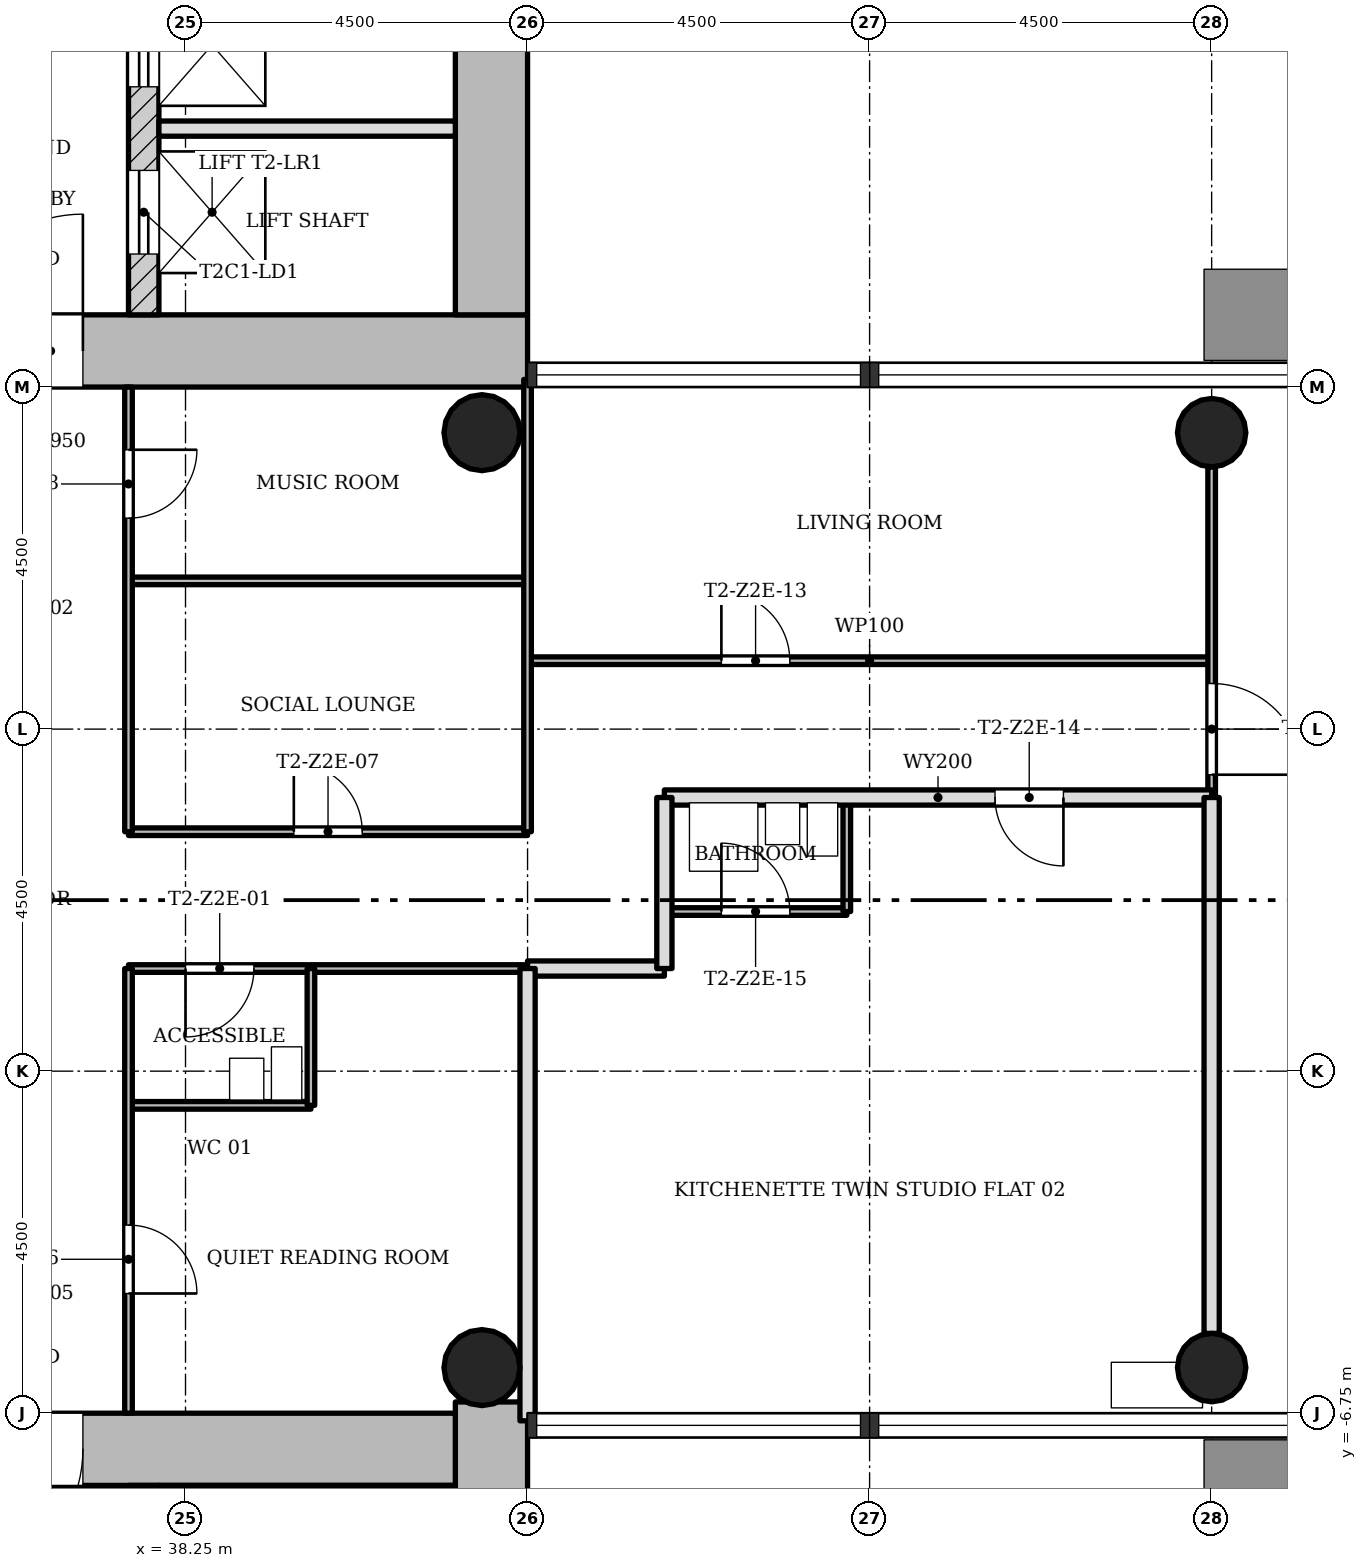
"""IFC4 building model, lengths in metres.
Left out: names, types, materials, properties, quantities, classifications, styles, units other than length and angle.
Written with IfcOpenShell. Run it as: python <this file> out.ifc"""

import sys

from ifc_helpers import new_model, si_unit, direction, frame, frame_2d, origin, origin_2d, place, context, subcontext, project, spatial, rectangle, hollow_circle, extrude, element, fill, save


model = new_model("IFC4")
c1 = context("Model", 3, precision=1e-05, world=origin(), true_north=direction((0.0, 1.0)))
c2 = subcontext(c1, "Body", "Model", "MODEL_VIEW")
j1 = project(units=[si_unit("LENGTHUNIT", "METRE"), si_unit("PLANEANGLEUNIT", "RADIAN")], contexts=[c1])
p1 = place(None, origin())
s1 = spatial("IfcSite", under=j1, at=p1, CompositionType="ELEMENT")
p2 = place(p1, origin())
s2 = spatial("IfcBuilding", under=s1, at=p2, CompositionType="ELEMENT")
p3 = place(p2, frame((0.0, 0.0, 100.4)))
s3 = spatial("IfcBuildingStorey", under=s2, at=p3, CompositionType="ELEMENT", Elevation=100.4)
p4 = place(p3, frame((30.2, 7.225, 0.0), z_axis=(0.0, 0.0, 1.0), x_axis=(1.0, 0.0, 0.0)))
e1 = element("IfcWall", 1, at=p4, inside=s3, PredefinedType="SHEAR", context=c2, shape_type="SweptSolid", body=[
    extrude(rectangle(XDim=12.55, YDim=0.95, at=frame_2d((6.275, 0.0))), origin(), (0.0, 0.0, 1.0), 3.4),
])
p5 = place(p4, frame((4.9, 0.0, 0.0)))
e2 = element("IfcOpeningElement", 2, at=p5, cuts=e1, PredefinedType="OPENING", context=c2, shape_type="SweptSolid", body=[
    extrude(rectangle(XDim=1.8, YDim=2.1, at=frame_2d((0.9, 1.05))), frame((0.0, 0.485, 0.0), z_axis=(0.0, -1.0, 0.0), x_axis=(1.0, 0.0, 0.0)), (0.0, 0.0, 1.0), 0.97),
])
p6 = place(p3, frame((42.275, 7.7, 0.0), z_axis=(0.0, 0.0, 1.0), x_axis=(0.0, 1.0, 0.0)))
e3 = element("IfcWall", 3, at=p6, inside=s3, PredefinedType="SHEAR", context=c2, shape_type="SweptSolid", body=[
    extrude(rectangle(XDim=8.05, YDim=0.95, at=frame_2d((4.025, 0.0))), origin(), (0.0, 0.0, 1.0), 3.4),
])
p7 = place(p3, frame((37.7, 7.7, 0.0), z_axis=(0.0, 0.0, 1.0), x_axis=(0.0, 1.0, 0.0)))
e4 = element("IfcWall", 4, at=p7, inside=s3, PredefinedType="SHEAR", context=c2, shape_type="SweptSolid", body=[
    extrude(rectangle(XDim=7.1, YDim=0.4, at=frame_2d((3.55, 0.0))), origin(), (0.0, 0.0, 1.0), 3.4),
])
p8 = place(p7, frame((0.8, 0.0, 0.0)))
e5 = element("IfcOpeningElement", 5, at=p8, cuts=e4, PredefinedType="OPENING", context=c2, shape_type="SweptSolid", body=[
    extrude(rectangle(XDim=1.1, YDim=2.1, at=frame_2d((0.55, 1.05))), frame((0.0, 0.21, 0.0), z_axis=(0.0, -1.0, 0.0), x_axis=(1.0, 0.0, 0.0)), (0.0, 0.0, 1.0), 0.42),
])
p9 = place(p7, frame((3.0, 0.0, 0.0)))
e6 = element("IfcOpeningElement", 6, at=p9, cuts=e4, PredefinedType="OPENING", context=c2, shape_type="SweptSolid", body=[
    extrude(rectangle(XDim=1.1, YDim=2.1, at=frame_2d((0.55, 1.05))), frame((0.0, 0.21, 0.0), z_axis=(0.0, -1.0, 0.0), x_axis=(1.0, 0.0, 0.0)), (0.0, 0.0, 1.0), 0.42),
])
p10 = place(p7, frame((5.2, 0.0, 0.0)))
e7 = element("IfcOpeningElement", 7, at=p10, cuts=e4, PredefinedType="OPENING", context=c2, shape_type="SweptSolid", body=[
    extrude(rectangle(XDim=1.1, YDim=2.1, at=frame_2d((0.55, 1.05))), frame((0.0, 0.21, 0.0), z_axis=(0.0, -1.0, 0.0), x_axis=(1.0, 0.0, 0.0)), (0.0, 0.0, 1.0), 0.42),
])
p11 = place(p3, frame((42.275, -14.8, 0.0), z_axis=(0.0, 0.0, 1.0), x_axis=(0.0, 1.0, 0.0)))
e8 = element("IfcWall", 8, at=p11, inside=s3, PredefinedType="SHEAR", context=c2, shape_type="SweptSolid", body=[
    extrude(rectangle(XDim=8.198, YDim=0.95, at=frame_2d((4.099, 0.0))), origin(), (0.0, 0.0, 1.0), 3.4),
])
p12 = place(p3, frame((41.8, -7.225, 0.0), z_axis=(0.0, 0.0, 1.0), x_axis=(-1.0, 0.0, 0.0)))
e9 = element("IfcWall", 9, at=p12, inside=s3, PredefinedType="SHEAR", context=c2, shape_type="SweptSolid", body=[
    extrude(rectangle(XDim=12.55, YDim=0.95, at=frame_2d((6.275, 0.0))), origin(), (0.0, 0.0, 1.0), 3.4),
])
p13 = place(p12, frame((4.9, 0.0, 0.0)))
e10 = element("IfcOpeningElement", 10, at=p13, cuts=e9, PredefinedType="OPENING", context=c2, shape_type="SweptSolid", body=[
    extrude(rectangle(XDim=1.8, YDim=2.1, at=frame_2d((0.9, 1.05))), frame((0.0, 0.485, 0.0), z_axis=(0.0, -1.0, 0.0), x_axis=(1.0, 0.0, 0.0)), (0.0, 0.0, 1.0), 0.97),
])
p14 = place(p3, frame((37.7, -14.8, 0.0), z_axis=(0.0, 0.0, 1.0), x_axis=(0.0, 1.0, 0.0)))
e11 = element("IfcWall", 11, at=p14, inside=s3, PredefinedType="SHEAR", context=c2, shape_type="SweptSolid", body=[
    extrude(rectangle(XDim=7.1, YDim=0.4, at=frame_2d((3.55, 0.0))), origin(), (0.0, 0.0, 1.0), 3.4),
])
p15 = place(p14, frame((5.5, 0.0, 0.0)))
e12 = element("IfcOpeningElement", 12, at=p15, cuts=e11, PredefinedType="OPENING", context=c2, shape_type="SweptSolid", body=[
    extrude(rectangle(XDim=0.9, YDim=2.1, at=frame_2d((0.45, 1.05))), frame((0.0, 0.21, 0.0), z_axis=(0.0, -1.0, 0.0), x_axis=(1.0, 0.0, 0.0)), (0.0, 0.0, 1.0), 0.42),
])
for number, where, z_axis, x_axis in (
    (13, (51.75, -6.15, 0.0), (0.0, 0.0, 1.0), (1.0, 0.0, 0.0)),
    (14, (51.75, 6.15, 0.0), (0.0, 0.0, 1.0), (1.0, 0.0, 0.0)),
):
    element("IfcColumn", number, at=place(p3, frame(where, z_axis=z_axis, x_axis=x_axis)), inside=s3, PredefinedType="COLUMN", context=c2, shape_type="SweptSolid", body=[
        extrude(hollow_circle(Radius=0.45, WallThickness=0.032, at=origin_2d()), origin(), (0.0, 0.0, 1.0), 3.4),
    ])
for number, where, z_axis, x_axis in (
    (15, (42.15, -6.15, 0.0), (0.0, 0.0, 1.0), (1.0, 0.0, 0.0)),
    (16, (42.15, 6.15, 0.0), (0.0, 0.0, 1.0), (1.0, 0.0, 0.0)),
):
    element("IfcColumn", number, at=place(p3, frame(where, z_axis=z_axis, x_axis=x_axis)), inside=s3, PredefinedType="COLUMN", context=c2, shape_type="SweptSolid", body=[
        extrude(hollow_circle(Radius=0.5, WallThickness=0.036, at=origin_2d()), origin(), (0.0, 0.0, 1.0), 3.4),
    ])
p16 = place(p3, frame((41.8, 10.15, 0.0), z_axis=(0.0, 0.0, 1.0), x_axis=(-1.0, 0.0, 0.0)))
e17 = element("IfcWall", 17, at=p16, inside=s3, PredefinedType="SOLIDWALL", context=c2, shape_type="SweptSolid", body=[
    extrude(rectangle(XDim=3.9, YDim=0.2, at=frame_2d((1.95, 0.0))), origin(), (0.0, 0.0, 1.0), 3.0),
])
p17 = place(p3, frame((39.9, -2.7, 0.0), z_axis=(0.0, 0.0, 1.0), x_axis=(-1.0, 0.0, 0.0)))
e18 = element("IfcWall", 18, at=p17, inside=s3, PredefinedType="PARTITIONING", context=c2, shape_type="SweptSolid", body=[
    extrude(rectangle(XDim=2.4, YDim=0.1, at=frame_2d((1.2, 0.0))), origin(), (0.0, 0.0, 1.0), 3.0),
])
p18 = place(p3, frame((42.75, -0.9, 0.0), z_axis=(0.0, 0.0, 1.0), x_axis=(-1.0, 0.0, 0.0)))
e19 = element("IfcWall", 19, at=p18, inside=s3, PredefinedType="PARTITIONING", context=c2, shape_type="SweptSolid", body=[
    extrude(rectangle(XDim=5.25, YDim=0.1, at=frame_2d((2.625, 0.0))), origin(), (0.0, 0.0, 1.0), 3.0),
])
p19 = place(p18, frame((3.6, 0.0, 0.0)))
e20 = element("IfcOpeningElement", 20, at=p19, cuts=e19, PredefinedType="OPENING", context=c2, shape_type="SweptSolid", body=[
    extrude(rectangle(XDim=0.9, YDim=2.1, at=frame_2d((0.45, 1.05))), frame((0.0, 0.06, 0.0), z_axis=(0.0, -1.0, 0.0), x_axis=(1.0, 0.0, 0.0)), (0.0, 0.0, 1.0), 0.12),
])
p20 = place(p3, frame((44.55, -0.9, 0.0), z_axis=(0.0, 0.0, 1.0), x_axis=(-1.0, 0.0, 0.0)))
e21 = element("IfcWall", 21, at=p20, inside=s3, PredefinedType="SOLIDWALL", context=c2, shape_type="SweptSolid", body=[
    extrude(rectangle(XDim=1.8, YDim=0.2, at=frame_2d((0.9, 0.0))), origin(), (0.0, 0.0, 1.0), 3.0),
])
p21 = place(p3, frame((46.95, -0.15, 0.0), z_axis=(0.0, 0.0, 1.0), x_axis=(-1.0, 0.0, 0.0)))
e22 = element("IfcWall", 22, at=p21, inside=s3, PredefinedType="PARTITIONING", context=c2, shape_type="SweptSolid", body=[
    extrude(rectangle(XDim=2.4, YDim=0.1, at=frame_2d((1.2, 0.0))), origin(), (0.0, 0.0, 1.0), 3.0),
])
p22 = place(p21, frame((0.75, 0.0, 0.0)))
e23 = element("IfcOpeningElement", 23, at=p22, cuts=e22, PredefinedType="OPENING", context=c2, shape_type="SweptSolid", body=[
    extrude(rectangle(XDim=0.9, YDim=2.1, at=frame_2d((0.45, 1.05))), frame((0.0, 0.06, 0.0), z_axis=(0.0, -1.0, 0.0), x_axis=(1.0, 0.0, 0.0)), (0.0, 0.0, 1.0), 0.12),
])
p23 = place(p3, frame((42.75, 0.9, 0.0), z_axis=(0.0, 0.0, 1.0), x_axis=(-1.0, 0.0, 0.0)))
e24 = element("IfcWall", 24, at=p23, inside=s3, PredefinedType="PARTITIONING", context=c2, shape_type="SweptSolid", body=[
    extrude(rectangle(XDim=5.25, YDim=0.1, at=frame_2d((2.625, 0.0))), origin(), (0.0, 0.0, 1.0), 3.0),
])
p24 = place(p23, frame((2.175, 0.0, 0.0)))
e25 = element("IfcOpeningElement", 25, at=p24, cuts=e24, PredefinedType="OPENING", context=c2, shape_type="SweptSolid", body=[
    extrude(rectangle(XDim=0.9, YDim=2.1, at=frame_2d((0.45, 1.05))), frame((0.0, 0.06, 0.0), z_axis=(0.0, -1.0, 0.0), x_axis=(1.0, 0.0, 0.0)), (0.0, 0.0, 1.0), 0.12),
])
p25 = place(p3, frame((51.75, 1.35, 0.0), z_axis=(0.0, 0.0, 1.0), x_axis=(-1.0, 0.0, 0.0)))
e26 = element("IfcWall", 26, at=p25, inside=s3, PredefinedType="SOLIDWALL", context=c2, shape_type="SweptSolid", body=[
    extrude(rectangle(XDim=7.2, YDim=0.2, at=frame_2d((3.6, 0.0))), origin(), (0.0, 0.0, 1.0), 3.0),
])
p26 = place(p25, frame((1.95, 0.0, 0.0)))
e27 = element("IfcOpeningElement", 27, at=p26, cuts=e26, PredefinedType="OPENING", context=c2, shape_type="SweptSolid", body=[
    extrude(rectangle(XDim=0.9, YDim=2.1, at=frame_2d((0.45, 1.05))), frame((0.0, 0.11, 0.0), z_axis=(0.0, -1.0, 0.0), x_axis=(1.0, 0.0, 0.0)), (0.0, 0.0, 1.0), 0.22),
])
p27 = place(p3, frame((51.75, 3.15, 0.0), z_axis=(0.0, 0.0, 1.0), x_axis=(-1.0, 0.0, 0.0)))
e28 = element("IfcWall", 28, at=p27, inside=s3, PredefinedType="PARTITIONING", context=c2, shape_type="SweptSolid", body=[
    extrude(rectangle(XDim=9.0, YDim=0.1, at=frame_2d((4.5, 0.0))), origin(), (0.0, 0.0, 1.0), 3.0),
])
p28 = place(p27, frame((5.55, 0.0, 0.0)))
e29 = element("IfcOpeningElement", 29, at=p28, cuts=e28, PredefinedType="OPENING", context=c2, shape_type="SweptSolid", body=[
    extrude(rectangle(XDim=0.9, YDim=2.1, at=frame_2d((0.45, 1.05))), frame((0.0, 0.06, 0.0), z_axis=(0.0, -1.0, 0.0), x_axis=(1.0, 0.0, 0.0)), (0.0, 0.0, 1.0), 0.12),
])
p29 = place(p3, frame((42.75, 4.2, 0.0), z_axis=(0.0, 0.0, 1.0), x_axis=(-1.0, 0.0, 0.0)))
e30 = element("IfcWall", 30, at=p29, inside=s3, PredefinedType="PARTITIONING", context=c2, shape_type="SweptSolid", body=[
    extrude(rectangle(XDim=5.25, YDim=0.1, at=frame_2d((2.625, 0.0))), origin(), (0.0, 0.0, 1.0), 3.0),
])
p30 = place(p3, frame((51.75, 1.35, 0.0), z_axis=(0.0, 0.0, 1.0), x_axis=(0.0, 1.0, 0.0)))
e31 = element("IfcWall", 31, at=p30, inside=s3, PredefinedType="PARTITIONING", context=c2, shape_type="SweptSolid", body=[
    extrude(rectangle(XDim=4.35, YDim=0.1, at=frame_2d((2.175, 0.0))), origin(), (0.0, 0.0, 1.0), 3.0),
])
p31 = place(p30, frame((0.3, 0.0, 0.0)))
e32 = element("IfcOpeningElement", 32, at=p31, cuts=e31, PredefinedType="OPENING", context=c2, shape_type="SweptSolid", body=[
    extrude(rectangle(XDim=1.2, YDim=2.1, at=frame_2d((0.6, 1.05))), frame((0.0, 0.06, 0.0), z_axis=(0.0, -1.0, 0.0), x_axis=(1.0, 0.0, 0.0)), (0.0, 0.0, 1.0), 0.12),
])
p32 = place(p3, frame((51.75, -5.7, 0.0), z_axis=(0.0, 0.0, 1.0), x_axis=(0.0, 1.0, 0.0)))
e33 = element("IfcWall", 33, at=p32, inside=s3, PredefinedType="SOLIDWALL", context=c2, shape_type="SweptSolid", body=[
    extrude(rectangle(XDim=7.05, YDim=0.2, at=frame_2d((3.525, 0.0))), origin(), (0.0, 0.0, 1.0), 3.0),
])
p33 = place(p3, frame((46.95, -0.15, 0.0), z_axis=(0.0, 0.0, 1.0), x_axis=(0.0, 1.0, 0.0)))
e34 = element("IfcWall", 34, at=p33, inside=s3, PredefinedType="PARTITIONING", context=c2, shape_type="SweptSolid", body=[
    extrude(rectangle(XDim=1.5, YDim=0.1, at=frame_2d((0.75, 0.0))), origin(), (0.0, 0.0, 1.0), 3.0),
])
p34 = place(p3, frame((44.55, -0.9, 0.0), z_axis=(0.0, 0.0, 1.0), x_axis=(0.0, 1.0, 0.0)))
e35 = element("IfcWall", 35, at=p34, inside=s3, PredefinedType="SOLIDWALL", context=c2, shape_type="SweptSolid", body=[
    extrude(rectangle(XDim=2.25, YDim=0.2, at=frame_2d((1.125, 0.0))), origin(), (0.0, 0.0, 1.0), 3.0),
])
p35 = place(p3, frame((42.75, 0.9, 0.0), z_axis=(0.0, 0.0, 1.0), x_axis=(0.0, 1.0, 0.0)))
e36 = element("IfcWall", 36, at=p35, inside=s3, PredefinedType="PARTITIONING", context=c2, shape_type="SweptSolid", body=[
    extrude(rectangle(XDim=5.95, YDim=0.1, at=frame_2d((2.975, 0.0))), origin(), (0.0, 0.0, 1.0), 3.0),
])
p36 = place(p3, frame((42.75, -6.85, 0.0), z_axis=(0.0, 0.0, 1.0), x_axis=(0.0, 1.0, 0.0)))
e37 = element("IfcWall", 37, at=p36, inside=s3, PredefinedType="SOLIDWALL", context=c2, shape_type="SweptSolid", body=[
    extrude(rectangle(XDim=5.95, YDim=0.2, at=frame_2d((2.975, 0.0))), origin(), (0.0, 0.0, 1.0), 3.0),
])
p37 = place(p3, frame((39.9, -2.7, 0.0), z_axis=(0.0, 0.0, 1.0), x_axis=(0.0, 1.0, 0.0)))
e38 = element("IfcWall", 38, at=p37, inside=s3, PredefinedType="PARTITIONING", context=c2, shape_type="SweptSolid", body=[
    extrude(rectangle(XDim=1.8, YDim=0.1, at=frame_2d((0.9, 0.0))), origin(), (0.0, 0.0, 1.0), 3.0),
])
p38 = place(p3, frame((37.5, -6.75, 0.0), z_axis=(0.0, 0.0, 1.0), x_axis=(0.0, 1.0, 0.0)))
e39 = element("IfcWall", 39, at=p38, inside=s3, PredefinedType="PARTITIONING", context=c2, shape_type="SweptSolid", body=[
    extrude(rectangle(XDim=5.85, YDim=0.1, at=frame_2d((2.925, 0.0))), origin(), (0.0, 0.0, 1.0), 3.0),
])
p39 = place(p38, frame((1.575, 0.0, 0.0)))
e40 = element("IfcOpeningElement", 40, at=p39, cuts=e39, PredefinedType="OPENING", context=c2, shape_type="SweptSolid", body=[
    extrude(rectangle(XDim=0.9, YDim=2.1, at=frame_2d((0.45, 1.05))), frame((0.0, 0.06, 0.0), z_axis=(0.0, -1.0, 0.0), x_axis=(1.0, 0.0, 0.0)), (0.0, 0.0, 1.0), 0.12),
])
p40 = place(p3, frame((37.5, 0.9, 0.0), z_axis=(0.0, 0.0, 1.0), x_axis=(0.0, 1.0, 0.0)))
e41 = element("IfcWall", 41, at=p40, inside=s3, PredefinedType="PARTITIONING", context=c2, shape_type="SweptSolid", body=[
    extrude(rectangle(XDim=5.85, YDim=0.1, at=frame_2d((2.925, 0.0))), origin(), (0.0, 0.0, 1.0), 3.0),
])
p41 = place(p40, frame((4.125, 0.0, 0.0)))
e42 = element("IfcOpeningElement", 42, at=p41, cuts=e41, PredefinedType="OPENING", context=c2, shape_type="SweptSolid", body=[
    extrude(rectangle(XDim=0.9, YDim=2.1, at=frame_2d((0.45, 1.05))), frame((0.0, 0.06, 0.0), z_axis=(0.0, -1.0, 0.0), x_axis=(1.0, 0.0, 0.0)), (0.0, 0.0, 1.0), 0.12),
])
p42 = place(p3, frame((37.9, -7.825, 0.0), z_axis=(0.0, 0.0, 1.0), x_axis=(1.0, 0.0, 0.0)))
e43 = element("IfcWall", 43, at=p42, inside=s3, PredefinedType="SHEAR", context=c2, shape_type="SweptSolid", body=[
    extrude(rectangle(XDim=3.9, YDim=0.25, at=frame_2d((1.95, 0.0))), origin(), (0.0, 0.0, 1.0), 3.4),
])
p43 = place(p19, origin())
e44 = element("IfcDoor", 44, at=p43, inside=s3, OperationType="SINGLE_SWING_LEFT", PredefinedType="DOOR", context=c2, shape_type="SweptSolid", body=[
    extrude(rectangle(XDim=0.9, YDim=2.1, at=frame_2d((0.45, 1.05))), frame((0.0, 0.025, 0.0), z_axis=(0.0, -1.0, 0.0), x_axis=(1.0, 0.0, 0.0)), (0.0, 0.0, 1.0), 0.05),
])
fill(e20, e44)
p44 = place(p39, origin())
e45 = element("IfcDoor", 45, at=p44, inside=s3, OperationType="SINGLE_SWING_LEFT", PredefinedType="DOOR", context=c2, shape_type="SweptSolid", body=[
    extrude(rectangle(XDim=0.9, YDim=2.1, at=frame_2d((0.45, 1.05))), frame((0.0, 0.025, 0.0), z_axis=(0.0, -1.0, 0.0), x_axis=(1.0, 0.0, 0.0)), (0.0, 0.0, 1.0), 0.05),
])
fill(e40, e45)
p45 = place(p24, origin())
e46 = element("IfcDoor", 46, at=p45, inside=s3, OperationType="SINGLE_SWING_RIGHT", PredefinedType="DOOR", context=c2, shape_type="SweptSolid", body=[
    extrude(rectangle(XDim=0.9, YDim=2.1, at=frame_2d((0.45, 1.05))), frame((0.0, 0.025, 0.0), z_axis=(0.0, -1.0, 0.0), x_axis=(1.0, 0.0, 0.0)), (0.0, 0.0, 1.0), 0.05),
])
fill(e25, e46)
p46 = place(p41, origin())
e47 = element("IfcDoor", 47, at=p46, inside=s3, OperationType="SINGLE_SWING_RIGHT", PredefinedType="DOOR", context=c2, shape_type="SweptSolid", body=[
    extrude(rectangle(XDim=0.9, YDim=2.1, at=frame_2d((0.45, 1.05))), frame((0.0, 0.025, 0.0), z_axis=(0.0, -1.0, 0.0), x_axis=(1.0, 0.0, 0.0)), (0.0, 0.0, 1.0), 0.05),
])
fill(e42, e47)
p47 = place(p28, origin())
e48 = element("IfcDoor", 48, at=p47, inside=s3, OperationType="SINGLE_SWING_RIGHT", PredefinedType="DOOR", context=c2, shape_type="SweptSolid", body=[
    extrude(rectangle(XDim=0.9, YDim=2.1, at=frame_2d((0.45, 1.05))), frame((0.0, 0.025, 0.0), z_axis=(0.0, -1.0, 0.0), x_axis=(1.0, 0.0, 0.0)), (0.0, 0.0, 1.0), 0.05),
])
fill(e29, e48)
p48 = place(p26, origin())
e49 = element("IfcDoor", 49, at=p48, inside=s3, OperationType="SINGLE_SWING_RIGHT", PredefinedType="DOOR", context=c2, shape_type="SweptSolid", body=[
    extrude(rectangle(XDim=0.9, YDim=2.1, at=frame_2d((0.45, 1.05))), frame((0.0, 0.025, 0.0), z_axis=(0.0, -1.0, 0.0), x_axis=(1.0, 0.0, 0.0)), (0.0, 0.0, 1.0), 0.05),
])
fill(e27, e49)
p49 = place(p22, origin())
e50 = element("IfcDoor", 50, at=p49, inside=s3, OperationType="SINGLE_SWING_RIGHT", PredefinedType="DOOR", context=c2, shape_type="SweptSolid", body=[
    extrude(rectangle(XDim=0.9, YDim=2.1, at=frame_2d((0.45, 1.05))), frame((0.0, 0.025, 0.0), z_axis=(0.0, -1.0, 0.0), x_axis=(1.0, 0.0, 0.0)), (0.0, 0.0, 1.0), 0.05),
])
fill(e23, e50)
p50 = place(p31, origin())
e51 = element("IfcDoor", 51, at=p50, inside=s3, OperationType="SINGLE_SWING_LEFT", PredefinedType="DOOR", context=c2, shape_type="SweptSolid", body=[
    extrude(rectangle(XDim=1.2, YDim=2.1, at=frame_2d((0.6, 1.05))), frame((0.0, 0.025, 0.0), z_axis=(0.0, -1.0, 0.0), x_axis=(1.0, 0.0, 0.0)), (0.0, 0.0, 1.0), 0.05),
])
fill(e32, e51)
p51 = place(p8, origin())
e52 = element("IfcDoor", 52, at=p51, inside=s3, OperationType="SLIDING_TO_LEFT", PredefinedType="DOOR", context=c2, shape_type="SweptSolid", body=[
    extrude(rectangle(XDim=1.1, YDim=2.1, at=frame_2d((0.55, 1.05))), frame((0.0, 0.025, 0.0), z_axis=(0.0, -1.0, 0.0), x_axis=(1.0, 0.0, 0.0)), (0.0, 0.0, 1.0), 0.05),
])
fill(e5, e52)
p52 = place(p9, origin())
e53 = element("IfcDoor", 53, at=p52, inside=s3, OperationType="SLIDING_TO_LEFT", PredefinedType="DOOR", context=c2, shape_type="SweptSolid", body=[
    extrude(rectangle(XDim=1.1, YDim=2.1, at=frame_2d((0.55, 1.05))), frame((0.0, 0.025, 0.0), z_axis=(0.0, -1.0, 0.0), x_axis=(1.0, 0.0, 0.0)), (0.0, 0.0, 1.0), 0.05),
])
fill(e6, e53)
p53 = place(p5, origin())
e54 = element("IfcDoor", 54, at=p53, inside=s3, OperationType="SINGLE_SWING_LEFT", PredefinedType="DOOR", context=c2, shape_type="SweptSolid", body=[
    extrude(rectangle(XDim=1.8, YDim=2.1, at=frame_2d((0.9, 1.05))), frame((0.0, 0.025, 0.0), z_axis=(0.0, -1.0, 0.0), x_axis=(1.0, 0.0, 0.0)), (0.0, 0.0, 1.0), 0.05),
])
fill(e2, e54)
p54 = place(p13, origin())
e55 = element("IfcDoor", 55, at=p54, inside=s3, OperationType="SINGLE_SWING_LEFT", PredefinedType="DOOR", context=c2, shape_type="SweptSolid", body=[
    extrude(rectangle(XDim=1.8, YDim=2.1, at=frame_2d((0.9, 1.05))), frame((0.0, 0.025, 0.0), z_axis=(0.0, -1.0, 0.0), x_axis=(1.0, 0.0, 0.0)), (0.0, 0.0, 1.0), 0.05),
])
fill(e10, e55)
save(model, sys.argv[1])
